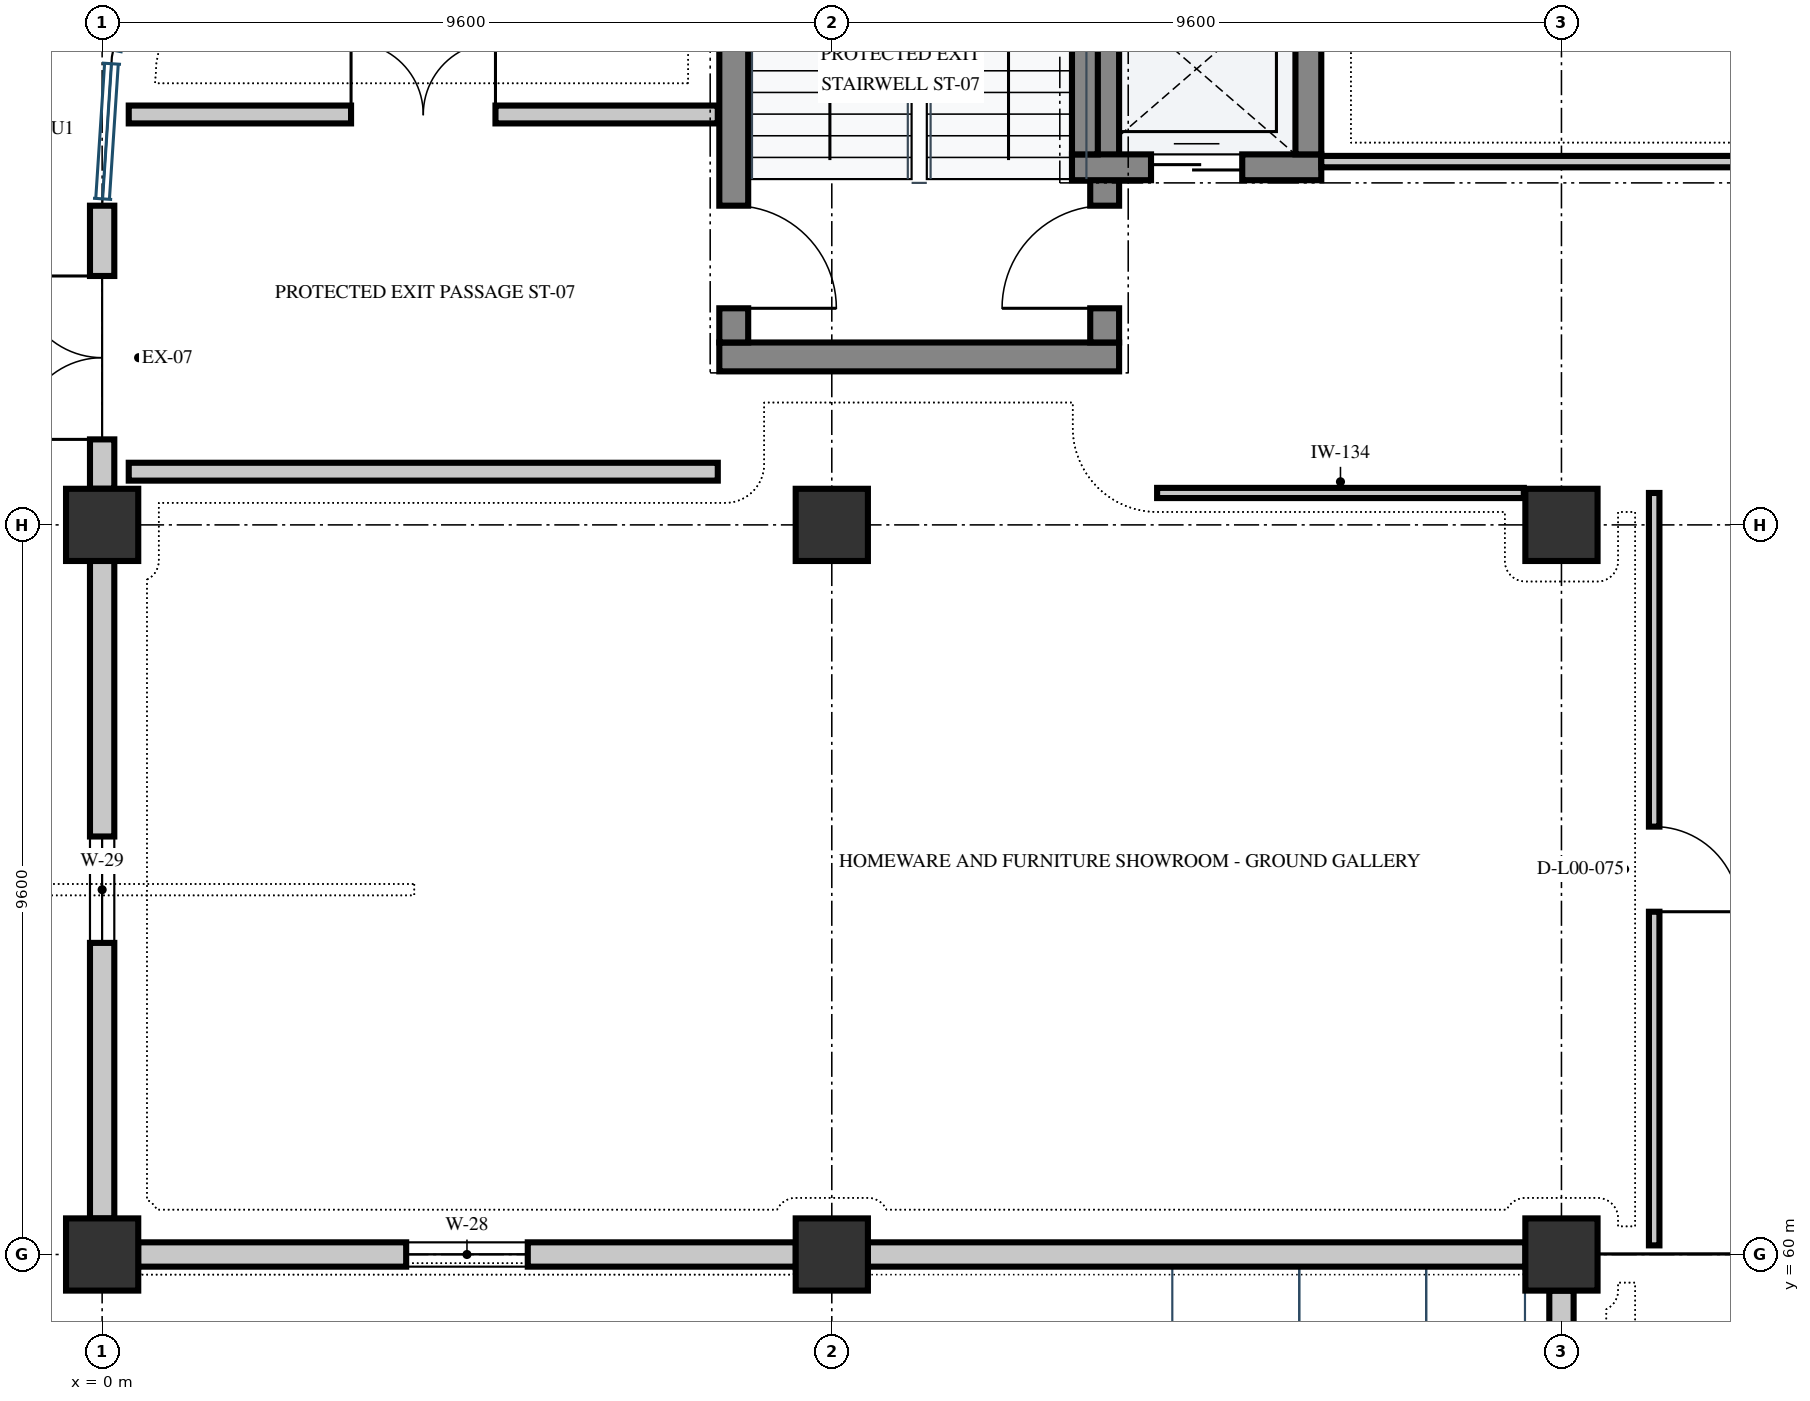
"""IFC4 building model, lengths in metres.
Left out: names, types, materials, properties, quantities, classifications, styles, units other than length and angle.
Written with IfcOpenShell. Run it as: python <this file> out.ifc"""

import sys

from ifc_helpers import new_model, si_unit, direction, frame, frame_2d, origin, origin_2d, place, context, subcontext, project, spatial, rectangle, extrude, element, fill, save


model = new_model("IFC4")
c1 = context("Model", 3, precision=1e-05, world=origin(), true_north=direction((0.0, 1.0)))
c2 = subcontext(c1, "Body", "Model", "MODEL_VIEW")
j1 = project(units=[si_unit("LENGTHUNIT", "METRE"), si_unit("PLANEANGLEUNIT", "RADIAN")], contexts=[c1])
p1 = place(None, origin())
s1 = spatial("IfcSite", under=j1, at=p1, CompositionType="ELEMENT")
p2 = place(p1, origin())
s2 = spatial("IfcBuilding", under=s1, at=p2, CompositionType="ELEMENT")
p3 = place(p2, origin())
s3 = spatial("IfcBuildingStorey", under=s2, at=p3, CompositionType="ELEMENT", Elevation=0.0)
for number, where, z_axis, x_axis in (
    (1, (0.0, 60.0, -0.3), (0.0, 0.0, 1.0), (1.0, 0.0, 0.0)),
    (2, (0.0, 69.6, -0.3), (0.0, 0.0, 1.0), (1.0, 0.0, 0.0)),
    (3, (9.6, 60.0, -0.3), (0.0, 0.0, 1.0), (1.0, 0.0, 0.0)),
    (4, (9.6, 69.6, -0.3), (0.0, 0.0, 1.0), (1.0, 0.0, 0.0)),
    (5, (19.2, 60.0, -0.3), (0.0, 0.0, 1.0), (1.0, 0.0, 0.0)),
    (6, (19.2, 69.6, -0.3), (0.0, 0.0, 1.0), (1.0, 0.0, 0.0)),
):
    element("IfcColumn", number, at=place(p3, frame(where, z_axis=z_axis, x_axis=x_axis)), inside=s3, PredefinedType="COLUMN", context=c2, shape_type="SweptSolid", body=[
        extrude(rectangle(XDim=0.95, YDim=0.95, at=origin_2d()), origin(), (0.0, 0.0, 1.0), 5.7),
    ])
p4 = place(p3, frame((19.2, 49.675, 0.0), z_axis=(0.0, 0.0, 1.0), x_axis=(0.0, 1.0, 0.0)))
e7 = element("IfcWall", 7, at=p4, inside=s3, PredefinedType="SOLIDWALL", context=c2, shape_type="SweptSolid", body=[
    extrude(rectangle(XDim=9.85, YDim=0.32, at=frame_2d((4.925, 0.0))), origin(), (0.0, 0.0, 1.0), 4.03),
])
p5 = place(p4, frame((3.725, 0.0, 0.0)))
e8 = element("IfcOpeningElement", 8, at=p5, cuts=e7, PredefinedType="OPENING", context=c2, shape_type="SweptSolid", body=[
    extrude(rectangle(XDim=2.4, YDim=2.8, at=frame_2d((1.2, 1.4))), frame((0.0, 0.172, 0.0), z_axis=(0.0, -1.0, 0.0), x_axis=(1.0, 0.0, 0.0)), (0.0, 0.0, 1.0), 0.344),
])
p6 = place(p3, frame((18.727, 60.0, 0.0), z_axis=(0.0, 0.0, 1.0), x_axis=(-1.0, 0.0, 0.0)))
e9 = element("IfcWall", 9, at=p6, inside=s3, PredefinedType="SOLIDWALL", context=c2, shape_type="SweptSolid", body=[
    extrude(rectangle(XDim=8.654, YDim=0.32, at=frame_2d((4.327, 0.0))), origin(), (0.0, 0.0, 1.0), 3.277),
])
p7 = place(p3, frame((9.127, 60.0, 0.0), z_axis=(0.0, 0.0, 1.0), x_axis=(-1.0, 0.0, 0.0)))
e10 = element("IfcWall", 10, at=p7, inside=s3, PredefinedType="SOLIDWALL", context=c2, shape_type="SweptSolid", body=[
    extrude(rectangle(XDim=8.654, YDim=0.32, at=frame_2d((4.327, 0.0))), origin(), (0.0, 0.0, 1.0), 4.03),
])
p8 = place(p7, frame((3.527, 0.0, 1.1)))
e11 = element("IfcOpeningElement", 11, at=p8, cuts=e10, PredefinedType="OPENING", context=c2, shape_type="SweptSolid", body=[
    extrude(rectangle(XDim=1.6, YDim=1.7, at=frame_2d((0.8, 0.85))), frame((0.0, 0.172, 0.0), z_axis=(0.0, -1.0, 0.0), x_axis=(1.0, 0.0, 0.0)), (0.0, 0.0, 1.0), 0.344),
])
p9 = place(p3, frame((0.0, 60.473, 0.0), z_axis=(0.0, 0.0, 1.0), x_axis=(0.0, 1.0, 0.0)))
e12 = element("IfcWall", 12, at=p9, inside=s3, PredefinedType="SOLIDWALL", context=c2, shape_type="SweptSolid", body=[
    extrude(rectangle(XDim=8.654, YDim=0.32, at=frame_2d((4.327, 0.0))), origin(), (0.0, 0.0, 1.0), 5.09),
])
p10 = place(p9, frame((3.627, 0.0, 1.15)))
e13 = element("IfcOpeningElement", 13, at=p10, cuts=e12, PredefinedType="OPENING", context=c2, shape_type="SweptSolid", body=[
    extrude(rectangle(XDim=1.4, YDim=1.65, at=frame_2d((0.7, 0.825))), frame((0.0, 0.172, 0.0), z_axis=(0.0, -1.0, 0.0), x_axis=(1.0, 0.0, 0.0)), (0.0, 0.0, 1.0), 0.344),
])
p11 = place(p3, frame((0.0, 70.075, 0.0), z_axis=(0.0, 0.0, 1.0), x_axis=(0.0, 1.0, 0.0)))
e14 = element("IfcWall", 14, at=p11, inside=s3, PredefinedType="SOLIDWALL", context=c2, shape_type="SweptSolid", body=[
    extrude(rectangle(XDim=3.725, YDim=0.32, at=frame_2d((1.863, 0.0))), origin(), (0.0, 0.0, 1.0), 5.09),
])
p12 = place(p11, frame((0.65, 0.0, 0.0)))
e15 = element("IfcOpeningElement", 15, at=p12, cuts=e14, PredefinedType="OPENING", context=c2, shape_type="SweptSolid", body=[
    extrude(rectangle(XDim=2.15, YDim=2.4, at=frame_2d((1.075, 1.2))), frame((0.0, 0.172, 0.0), z_axis=(0.0, -1.0, 0.0), x_axis=(1.0, 0.0, 0.0)), (0.0, 0.0, 1.0), 0.344),
])
p13 = place(p3, frame((8.12, 71.81, 0.0), z_axis=(0.0, 0.0, 1.0), x_axis=(1.0, 0.0, 0.0)))
e16 = element("IfcWall", 16, at=p13, inside=s3, PredefinedType="SHEAR", context=c2, shape_type="SweptSolid", body=[
    extrude(rectangle(XDim=5.26, YDim=0.38, at=frame_2d((2.63, 0.0))), origin(), (0.0, 0.0, 1.0), 5.09),
])
p14 = place(p3, frame((13.19, 72.0, 0.0), z_axis=(0.0, 0.0, 1.0), x_axis=(0.0, 1.0, 0.0)))
e17 = element("IfcWall", 17, at=p14, inside=s3, PredefinedType="SHEAR", context=c2, shape_type="SweptSolid", body=[
    extrude(rectangle(XDim=8.8, YDim=0.38, at=frame_2d((4.4, 0.0))), origin(), (0.0, 0.0, 1.0), 5.09),
])
p15 = place(p14, frame((0.45, 0.0, 0.0)))
e18 = element("IfcOpeningElement", 18, at=p15, cuts=e17, PredefinedType="OPENING", context=c2, shape_type="SweptSolid", body=[
    extrude(rectangle(XDim=1.35, YDim=2.2, at=frame_2d((0.675, 1.1))), frame((0.0, 0.202, 0.0), z_axis=(0.0, -1.0, 0.0), x_axis=(1.0, 0.0, 0.0)), (0.0, 0.0, 1.0), 0.404),
])
p16 = place(p3, frame((8.31, 72.0, 0.0), z_axis=(0.0, 0.0, 1.0), x_axis=(0.0, 1.0, 0.0)))
e19 = element("IfcWall", 19, at=p16, inside=s3, PredefinedType="SHEAR", context=c2, shape_type="SweptSolid", body=[
    extrude(rectangle(XDim=8.8, YDim=0.38, at=frame_2d((4.4, 0.0))), origin(), (0.0, 0.0, 1.0), 5.09),
])
p17 = place(p16, frame((0.45, 0.0, 0.0)))
e20 = element("IfcOpeningElement", 20, at=p17, cuts=e19, PredefinedType="OPENING", context=c2, shape_type="SweptSolid", body=[
    extrude(rectangle(XDim=1.35, YDim=2.2, at=frame_2d((0.675, 1.1))), frame((0.0, 0.202, 0.0), z_axis=(0.0, -1.0, 0.0), x_axis=(1.0, 0.0, 0.0)), (0.0, 0.0, 1.0), 0.404),
])
p18 = place(p3, frame((12.76, 74.305, 0.0), z_axis=(0.0, 0.0, 1.0), x_axis=(1.0, 0.0, 0.0)))
e21 = element("IfcWall", 21, at=p18, inside=s3, PredefinedType="SHEAR", context=c2, shape_type="SweptSolid", body=[
    extrude(rectangle(XDim=3.28, YDim=0.34, at=frame_2d((1.64, 0.0))), origin(), (0.0, 0.0, 1.0), 5.09),
])
p19 = place(p18, frame((1.04, 0.0, 0.0)))
e22 = element("IfcOpeningElement", 22, at=p19, cuts=e21, PredefinedType="OPENING", context=c2, shape_type="SweptSolid", body=[
    extrude(rectangle(XDim=1.2, YDim=2.2, at=frame_2d((0.6, 1.1))), frame((0.0, 0.182, 0.0), z_axis=(0.0, -1.0, 0.0), x_axis=(1.0, 0.0, 0.0)), (0.0, 0.0, 1.0), 0.364),
])
for number, where, z_axis, x_axis in (
    (23, (12.93, 74.475, 0.0), (0.0, 0.0, 1.0), (0.0, 1.0, 0.0)),
    (24, (15.87, 74.475, 0.0), (0.0, 0.0, 1.0), (0.0, 1.0, 0.0)),
):
    element("IfcWall", number, at=place(p3, frame(where, z_axis=z_axis, x_axis=x_axis)), inside=s3, PredefinedType="SHEAR", context=c2, shape_type="SweptSolid", body=[
        extrude(rectangle(XDim=2.25, YDim=0.34, at=frame_2d((1.125, 0.0))), origin(), (0.0, 0.0, 1.0), 5.09),
    ])
p20 = place(p3, frame((0.35, 70.3, 0.0), z_axis=(0.0, 0.0, 1.0), x_axis=(1.0, 0.0, 0.0)))
e25 = element("IfcWall", 25, at=p20, inside=s3, PredefinedType="PARTITIONING", context=c2, shape_type="SweptSolid", body=[
    extrude(rectangle(XDim=7.75, YDim=0.235, at=frame_2d((3.875, 0.0))), origin(), (0.0, 0.0, 1.0), 5.09),
])
p21 = place(p3, frame((0.35, 75.0, 0.0), z_axis=(0.0, 0.0, 1.0), x_axis=(1.0, 0.0, 0.0)))
e26 = element("IfcWall", 26, at=p21, inside=s3, PredefinedType="PARTITIONING", context=c2, shape_type="SweptSolid", body=[
    extrude(rectangle(XDim=7.75, YDim=0.235, at=frame_2d((3.875, 0.0))), origin(), (0.0, 0.0, 1.0), 5.09),
])
p22 = place(p21, frame((2.925, 0.0, 0.0)))
e27 = element("IfcOpeningElement", 27, at=p22, cuts=e26, PredefinedType="OPENING", context=c2, shape_type="SweptSolid", body=[
    extrude(rectangle(XDim=1.9, YDim=2.25, at=frame_2d((0.95, 1.125))), frame((0.0, 0.129, 0.0), z_axis=(0.0, -1.0, 0.0), x_axis=(1.0, 0.0, 0.0)), (0.0, 0.0, 1.0), 0.259),
])
p23 = place(p3, frame((22.36, 74.38, 0.0), z_axis=(0.0, 0.0, 1.0), x_axis=(-1.0, 0.0, 0.0)))
e28 = element("IfcWall", 28, at=p23, inside=s3, PredefinedType="PARTITIONING", context=c2, shape_type="SweptSolid", body=[
    extrude(rectangle(XDim=6.32, YDim=0.15, at=frame_2d((3.16, 0.0))), origin(), (0.0, 0.0, 1.0), 4.03),
])
p24 = place(p3, frame((20.42, 70.02, 0.0), z_axis=(0.0, 0.0, 1.0), x_axis=(0.0, -1.0, 0.0)))
e29 = element("IfcWall", 29, at=p24, inside=s3, PredefinedType="PARTITIONING", context=c2, shape_type="SweptSolid", body=[
    extrude(rectangle(XDim=9.9, YDim=0.138, at=frame_2d((4.95, 0.0))), origin(), (0.0, 0.0, 1.0), 4.03),
])
p25 = place(p24, frame((4.39, 0.0, 0.0)))
e30 = element("IfcOpeningElement", 30, at=p25, cuts=e29, PredefinedType="OPENING", context=c2, shape_type="SweptSolid", body=[
    extrude(rectangle(XDim=1.12, YDim=2.18, at=frame_2d((0.56, 1.09))), frame((0.0, 0.081, 0.0), z_axis=(0.0, -1.0, 0.0), x_axis=(1.0, 0.0, 0.0)), (0.0, 0.0, 1.0), 0.162),
])
p26 = place(p3, frame((13.88, 70.02, 0.0), z_axis=(0.0, 0.0, 1.0), x_axis=(1.0, 0.0, 0.0)))
e31 = element("IfcWall", 31, at=p26, inside=s3, PredefinedType="PARTITIONING", context=c2, shape_type="SweptSolid", body=[
    extrude(rectangle(XDim=4.825, YDim=0.134, at=frame_2d((2.413, 0.0))), origin(), (0.0, 0.0, 1.0), 5.09),
])
p27 = place(p8, origin())
e32 = element("IfcWindow", 32, at=p27, inside=s3, PartitioningType="SINGLE_PANEL", PredefinedType="WINDOW", context=c2, shape_type="SweptSolid", body=[
    extrude(rectangle(XDim=1.6, YDim=1.7, at=frame_2d((0.8, 0.85))), frame((0.0, 0.03, 0.0), z_axis=(0.0, -1.0, 0.0), x_axis=(1.0, 0.0, 0.0)), (0.0, 0.0, 1.0), 0.06),
])
fill(e11, e32)
p28 = place(p10, origin())
e33 = element("IfcWindow", 33, at=p28, inside=s3, PartitioningType="SINGLE_PANEL", PredefinedType="WINDOW", context=c2, shape_type="SweptSolid", body=[
    extrude(rectangle(XDim=1.4, YDim=1.65, at=frame_2d((0.7, 0.825))), frame((0.0, 0.03, 0.0), z_axis=(0.0, -1.0, 0.0), x_axis=(1.0, 0.0, 0.0)), (0.0, 0.0, 1.0), 0.06),
])
fill(e13, e33)
p29 = place(p12, origin())
e34 = element("IfcDoor", 34, at=p29, inside=s3, OperationType="DOUBLE_DOOR_SINGLE_SWING", PredefinedType="DOOR", context=c2, shape_type="SweptSolid", body=[
    extrude(rectangle(XDim=2.15, YDim=2.4, at=frame_2d((1.075, 1.2))), frame((0.0, 0.025, 0.0), z_axis=(0.0, -1.0, 0.0), x_axis=(1.0, 0.0, 0.0)), (0.0, 0.0, 1.0), 0.05),
])
fill(e15, e34)
p30 = place(p15, origin())
e35 = element("IfcDoor", 35, at=p30, inside=s3, OperationType="SINGLE_SWING_LEFT", PredefinedType="DOOR", context=c2, shape_type="SweptSolid", body=[
    extrude(rectangle(XDim=1.35, YDim=2.2, at=frame_2d((0.675, 1.1))), frame((0.0, 0.025, 0.0), z_axis=(0.0, -1.0, 0.0), x_axis=(1.0, 0.0, 0.0)), (0.0, 0.0, 1.0), 0.05),
])
fill(e18, e35)
p31 = place(p17, frame((1.35, 0.0, 0.0), z_axis=(0.0, 0.0, 1.0), x_axis=(-1.0, 0.0, 0.0)))
e36 = element("IfcDoor", 36, at=p31, inside=s3, OperationType="SINGLE_SWING_RIGHT", PredefinedType="DOOR", context=c2, shape_type="SweptSolid", body=[
    extrude(rectangle(XDim=1.35, YDim=2.2, at=frame_2d((0.675, 1.1))), frame((0.0, 0.025, 0.0), z_axis=(0.0, -1.0, 0.0), x_axis=(1.0, 0.0, 0.0)), (0.0, 0.0, 1.0), 0.05),
])
fill(e20, e36)
p32 = place(p19, origin())
e37 = element("IfcDoor", 37, at=p32, inside=s3, OperationType="DOUBLE_DOOR_SLIDING", PredefinedType="DOOR", context=c2, shape_type="SweptSolid", body=[
    extrude(rectangle(XDim=1.2, YDim=2.2, at=frame_2d((0.6, 1.1))), frame((0.0, 0.025, 0.0), z_axis=(0.0, -1.0, 0.0), x_axis=(1.0, 0.0, 0.0)), (0.0, 0.0, 1.0), 0.05),
])
fill(e22, e37)
p33 = place(p22, origin())
e38 = element("IfcDoor", 38, at=p33, inside=s3, OperationType="DOUBLE_DOOR_SINGLE_SWING", PredefinedType="DOOR", context=c2, shape_type="SweptSolid", body=[
    extrude(rectangle(XDim=1.9, YDim=2.25, at=frame_2d((0.95, 1.125))), frame((0.0, 0.025, 0.0), z_axis=(0.0, -1.0, 0.0), x_axis=(1.0, 0.0, 0.0)), (0.0, 0.0, 1.0), 0.05),
])
fill(e27, e38)
p34 = place(p25, origin())
e39 = element("IfcDoor", 39, at=p34, inside=s3, OperationType="SINGLE_SWING_RIGHT", PredefinedType="DOOR", context=c2, shape_type="SweptSolid", body=[
    extrude(rectangle(XDim=1.12, YDim=2.18, at=frame_2d((0.56, 1.09))), frame((0.0, 0.025, 0.0), z_axis=(0.0, -1.0, 0.0), x_axis=(1.0, 0.0, 0.0)), (0.0, 0.0, 1.0), 0.05),
])
fill(e30, e39)
save(model, sys.argv[1])
